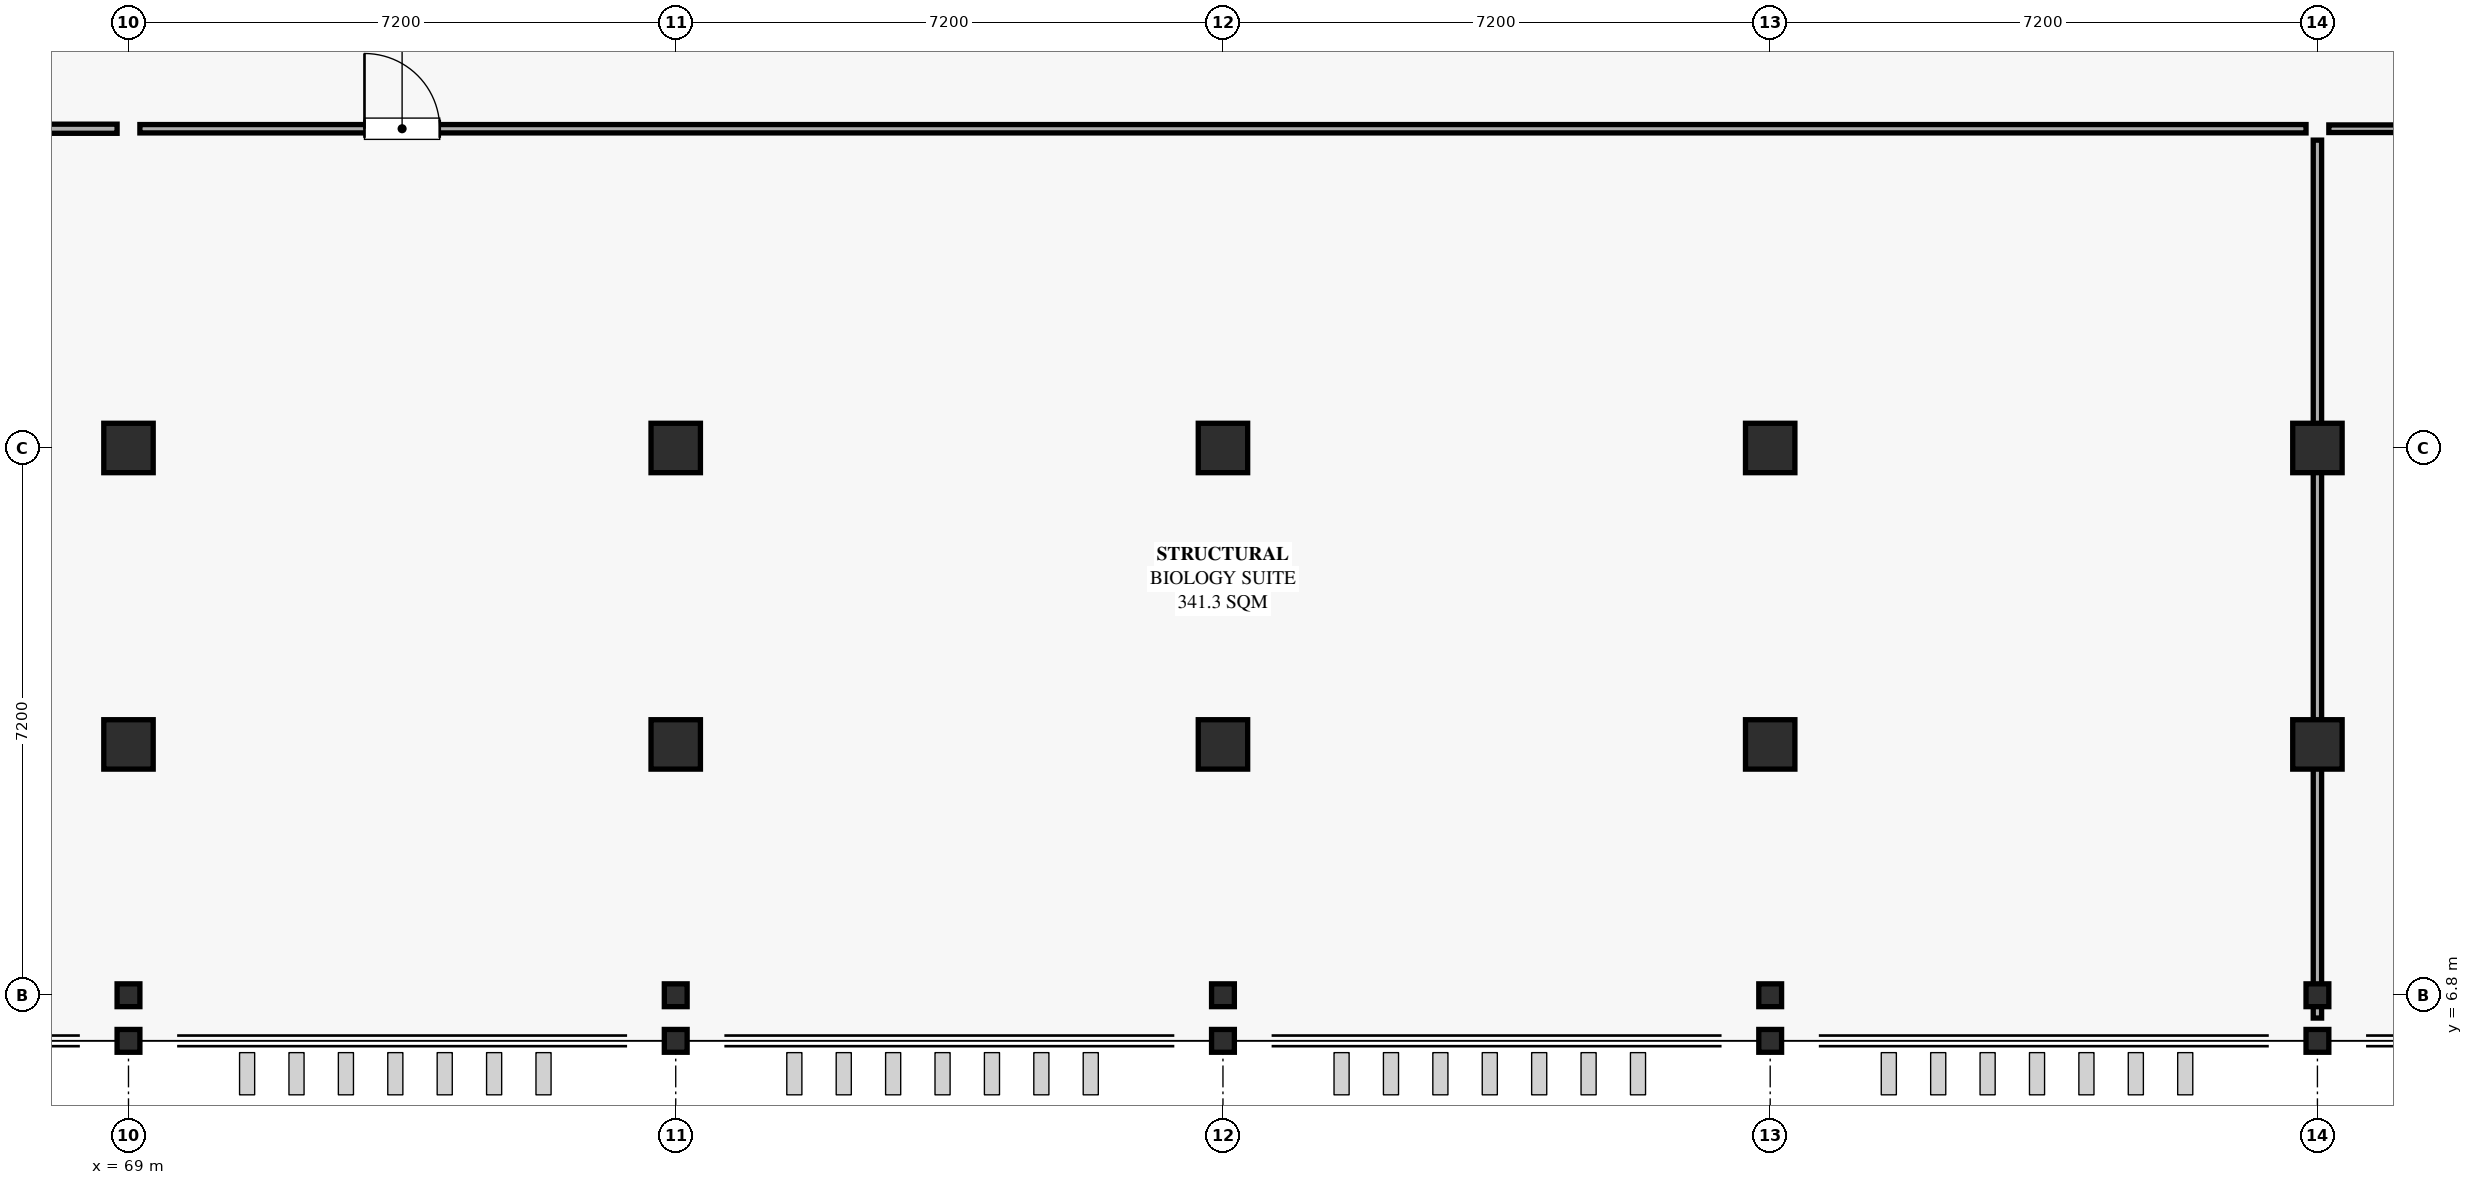
"""IFC4 building model, lengths in metres.
Left out: names, types, materials, properties, quantities, classifications, styles, units other than length and angle.
Written with IfcOpenShell. Run it as: python <this file> out.ifc"""

import sys

from ifc_helpers import new_model, si_unit, direction, frame, frame_2d, origin, origin_2d, place, context, subcontext, project, spatial, rectangle, hollow_rectangle, extrude, element, fill, save


model = new_model("IFC4")
c1 = context("Model", 3, precision=1e-05, world=origin(), true_north=direction((0.0, 1.0)))
c2 = subcontext(c1, "Body", "Model", "MODEL_VIEW")
j1 = project(units=[si_unit("LENGTHUNIT", "METRE"), si_unit("PLANEANGLEUNIT", "RADIAN")], contexts=[c1])
p1 = place(None, origin())
s1 = spatial("IfcSite", under=j1, at=p1, CompositionType="ELEMENT")
p2 = place(p1, origin())
s2 = spatial("IfcBuilding", under=s1, at=p2, CompositionType="ELEMENT")
p3 = place(p2, frame((0.0, 0.0, 37.62)))
s3 = spatial("IfcBuildingStorey", under=s2, at=p3, CompositionType="ELEMENT", Elevation=37.62)
for number, where, z_axis, x_axis in (
    (1, (69.0, 6.2, 0.0), (0.0, 0.0, 1.0), (1.0, 0.0, 0.0)),
    (2, (76.2, 6.2, 0.0), (0.0, 0.0, 1.0), (1.0, 0.0, 0.0)),
    (3, (83.4, 6.2, 0.0), (0.0, 0.0, 1.0), (1.0, 0.0, 0.0)),
    (4, (90.6, 6.2, 0.0), (0.0, 0.0, 1.0), (1.0, 0.0, 0.0)),
    (5, (97.8, 6.2, 0.0), (0.0, 0.0, 1.0), (1.0, 0.0, 0.0)),
    (6, (69.0, 6.8, 0.0), (0.0, 0.0, 1.0), (1.0, 0.0, 0.0)),
    (7, (76.2, 6.8, 0.0), (0.0, 0.0, 1.0), (1.0, 0.0, 0.0)),
    (8, (83.4, 6.8, 0.0), (0.0, 0.0, 1.0), (1.0, 0.0, 0.0)),
    (9, (90.6, 6.8, 0.0), (0.0, 0.0, 1.0), (1.0, 0.0, 0.0)),
    (10, (97.8, 6.8, 0.0), (0.0, 0.0, 1.0), (1.0, 0.0, 0.0)),
):
    element("IfcColumn", number, at=place(p3, frame(where, z_axis=z_axis, x_axis=x_axis)), inside=s3, PredefinedType="COLUMN", context=c2, shape_type="SweptSolid", body=[
        extrude(hollow_rectangle(XDim=0.3, YDim=0.3, WallThickness=0.012, InnerFilletRadius=0.018, OuterFilletRadius=0.03, at=origin_2d()), origin(), (0.0, 0.0, 1.0), 4.32),
    ])
for number, where, z_axis, x_axis in (
    (11, (69.0, 10.1, 0.0), (0.0, 0.0, 1.0), (1.0, 0.0, 0.0)),
    (12, (76.2, 10.1, 0.0), (0.0, 0.0, 1.0), (1.0, 0.0, 0.0)),
    (13, (83.4, 10.1, 0.0), (0.0, 0.0, 1.0), (1.0, 0.0, 0.0)),
    (14, (90.6, 10.1, 0.0), (0.0, 0.0, 1.0), (1.0, 0.0, 0.0)),
    (15, (97.8, 10.1, 0.0), (0.0, 0.0, 1.0), (1.0, 0.0, 0.0)),
    (16, (69.0, 14.0, 0.0), (0.0, 0.0, 1.0), (1.0, 0.0, 0.0)),
    (17, (76.2, 14.0, 0.0), (0.0, 0.0, 1.0), (1.0, 0.0, 0.0)),
    (18, (83.4, 14.0, 0.0), (0.0, 0.0, 1.0), (1.0, 0.0, 0.0)),
    (19, (90.6, 14.0, 0.0), (0.0, 0.0, 1.0), (1.0, 0.0, 0.0)),
    (20, (97.8, 14.0, 0.0), (0.0, 0.0, 1.0), (1.0, 0.0, 0.0)),
):
    element("IfcColumn", number, at=place(p3, frame(where, z_axis=z_axis, x_axis=x_axis)), inside=s3, PredefinedType="COLUMN", context=c2, shape_type="SweptSolid", body=[
        extrude(rectangle(XDim=0.65, YDim=0.65, at=origin_2d()), origin(), (0.0, 0.0, 1.0), 4.32),
    ])
p4 = place(p3, frame((54.95, 18.2, 0.0), z_axis=(0.0, 0.0, 1.0), x_axis=(1.0, 0.0, 0.0)))
e21 = element("IfcWall", 21, at=p4, inside=s3, PredefinedType="PARTITIONING", context=c2, shape_type="SweptSolid", body=[
    extrude(rectangle(XDim=13.9, YDim=0.12, at=frame_2d((6.95, 0.0))), origin(), (0.0, 0.0, 1.0), 2.8),
])
p5 = place(p4, frame((2.755, 0.0, 0.0)))
e22 = element("IfcOpeningElement", 22, at=p5, cuts=e21, PredefinedType="OPENING", context=c2, shape_type="SweptSolid", body=[
    extrude(rectangle(XDim=0.99, YDim=2.05, at=frame_2d((0.495, 1.025))), frame((0.0, 0.07, 0.0), z_axis=(0.0, -1.0, 0.0), x_axis=(1.0, 0.0, 0.0)), (0.0, 0.0, 1.0), 0.14),
])
p6 = place(p3, frame((69.15, 18.2, 0.0), z_axis=(0.0, 0.0, 1.0), x_axis=(1.0, 0.0, 0.0)))
e23 = element("IfcWall", 23, at=p6, inside=s3, PredefinedType="PARTITIONING", context=c2, shape_type="SweptSolid", body=[
    extrude(rectangle(XDim=28.5, YDim=0.11, at=frame_2d((14.25, 0.0))), origin(), (0.0, 0.0, 1.0), 2.8),
])
p7 = place(p6, frame((2.955, 0.0, 0.0)))
e24 = element("IfcOpeningElement", 24, at=p7, cuts=e23, PredefinedType="OPENING", context=c2, shape_type="SweptSolid", body=[
    extrude(rectangle(XDim=0.99, YDim=2.1, at=frame_2d((0.495, 1.05))), frame((0.0, 0.065, 0.0), z_axis=(0.0, -1.0, 0.0), x_axis=(1.0, 0.0, 0.0)), (0.0, 0.0, 1.0), 0.13),
])
p8 = place(p3, frame((97.8, 18.05, 0.0), z_axis=(0.0, 0.0, 1.0), x_axis=(0.0, -1.0, 0.0)))
e25 = element("IfcWall", 25, at=p8, inside=s3, PredefinedType="PARTITIONING", context=c2, shape_type="SweptSolid", body=[
    extrude(rectangle(XDim=11.55, YDim=0.11, at=frame_2d((5.775, 0.0))), origin(), (0.0, 0.0, 1.0), 2.8),
])
p9 = place(p3, frame((97.95, 18.2, 0.0), z_axis=(0.0, 0.0, 1.0), x_axis=(1.0, 0.0, 0.0)))
e26 = element("IfcWall", 26, at=p9, inside=s3, PredefinedType="PARTITIONING", context=c2, shape_type="SweptSolid", body=[
    extrude(rectangle(XDim=21.1, YDim=0.1, at=frame_2d((10.55, 0.0))), origin(), (0.0, 0.0, 1.0), 2.8),
])
p10 = place(p9, frame((17.355, 0.0, 0.0)))
e27 = element("IfcOpeningElement", 27, at=p10, cuts=e26, PredefinedType="OPENING", context=c2, shape_type="SweptSolid", body=[
    extrude(rectangle(XDim=0.99, YDim=2.16, at=frame_2d((0.495, 1.08))), frame((0.0, 0.06, 0.0), z_axis=(0.0, -1.0, 0.0), x_axis=(1.0, 0.0, 0.0)), (0.0, 0.0, 1.0), 0.12),
])
p11 = place(p7, origin())
e28 = element("IfcDoor", 28, at=p11, inside=s3, OperationType="SINGLE_SWING_LEFT", PredefinedType="DOOR", context=c2, shape_type="SweptSolid", body=[
    extrude(rectangle(XDim=0.99, YDim=2.1, at=frame_2d((0.495, 1.05))), frame((0.0, 0.025, 0.0), z_axis=(0.0, -1.0, 0.0), x_axis=(1.0, 0.0, 0.0)), (0.0, 0.0, 1.0), 0.05),
])
fill(e24, e28)
save(model, sys.argv[1])
